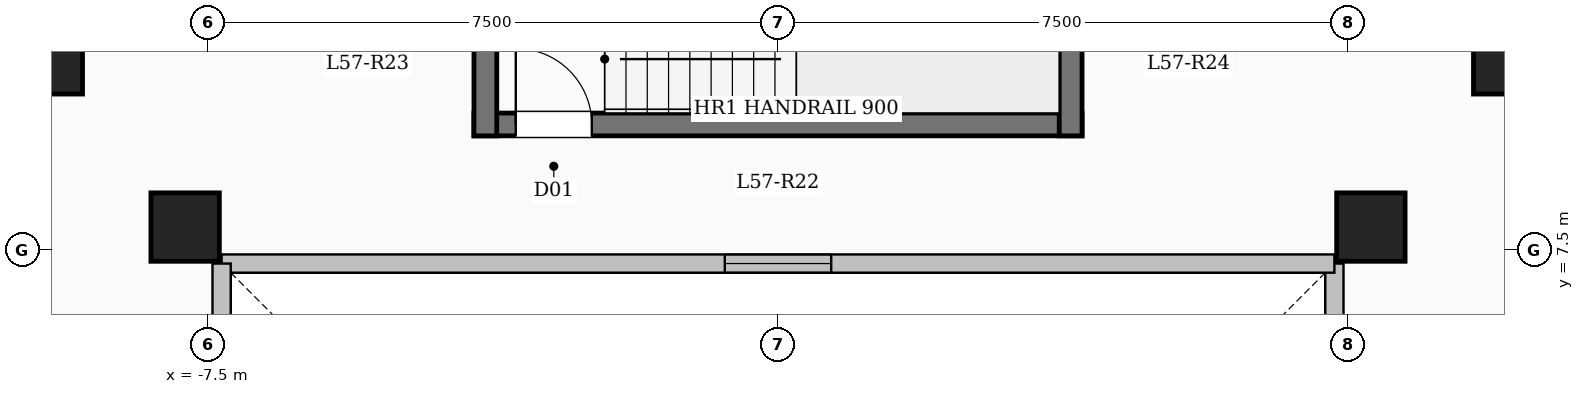
"""IFC4 building model, lengths in metres.
Left out: names, types, materials, properties, quantities, classifications, styles, units other than length and angle.
Written with IfcOpenShell. Run it as: python <this file> out.ifc"""

import sys

from ifc_helpers import new_model, si_unit, direction, frame, frame_2d, origin, origin_2d, place, context, subcontext, project, spatial, rectangle, extrude, element, fill, save


model = new_model("IFC4")
c1 = context("Model", 3, precision=1e-05, world=origin(), true_north=direction((0.0, 1.0)))
c2 = subcontext(c1, "Body", "Model", "MODEL_VIEW")
j1 = project(units=[si_unit("LENGTHUNIT", "METRE"), si_unit("PLANEANGLEUNIT", "RADIAN")], contexts=[c1])
p1 = place(None, origin())
s1 = spatial("IfcSite", under=j1, at=p1, CompositionType="ELEMENT")
p2 = place(p1, origin())
s2 = spatial("IfcBuilding", under=s1, at=p2, CompositionType="ELEMENT")
p3 = place(p2, frame((0.0, 0.0, 210.35)))
s3 = spatial("IfcBuildingStorey", under=s2, at=p3, CompositionType="ELEMENT", Elevation=210.35)
for number, where, z_axis, x_axis in (
    (1, (-7.8, 7.8, 0.0), (0.0, 0.0, 1.0), (1.0, 0.0, 0.0)),
    (2, (7.8, 7.8, 0.0), (0.0, 0.0, 1.0), (1.0, 0.0, 0.0)),
    (3, (-9.6, 10.0, 0.0), (0.0, 0.0, 1.0), (1.0, 0.0, 0.0)),
    (4, (9.6, 10.0, 0.0), (0.0, 0.0, 1.0), (1.0, 0.0, 0.0)),
):
    element("IfcColumn", number, at=place(p3, frame(where, z_axis=z_axis, x_axis=x_axis)), inside=s3, PredefinedType="COLUMN", context=c2, shape_type="SweptSolid", body=[
        extrude(rectangle(XDim=0.9, YDim=0.9, at=origin_2d()), origin(), (0.0, 0.0, 1.0), 3.35),
    ])
p4 = place(p3, frame((7.32, -7.32, 0.0), z_axis=(0.0, 0.0, 1.0), x_axis=(0.0, 1.0, 0.0)))
e5 = element("IfcWall", 5, at=p4, inside=s3, PredefinedType="SOLIDWALL", context=c2, shape_type="SweptSolid", body=[
    extrude(rectangle(XDim=14.64, YDim=0.24, at=frame_2d((7.32, 0.0))), origin(), (0.0, 0.0, 1.0), 3.1),
])
p5 = place(p4, frame((6.62, 0.0, 0.95)))
e6 = element("IfcOpeningElement", 6, at=p5, cuts=e5, PredefinedType="OPENING", context=c2, shape_type="SweptSolid", body=[
    extrude(rectangle(XDim=1.4, YDim=1.5, at=frame_2d((0.7, 0.75))), frame((0.0, 0.13, 0.0), z_axis=(0.0, -1.0, 0.0), x_axis=(1.0, 0.0, 0.0)), (0.0, 0.0, 1.0), 0.26),
])
p6 = place(p3, frame((7.32, 7.32, 0.0), z_axis=(0.0, 0.0, 1.0), x_axis=(-1.0, 0.0, 0.0)))
e7 = element("IfcWall", 7, at=p6, inside=s3, PredefinedType="SOLIDWALL", context=c2, shape_type="SweptSolid", body=[
    extrude(rectangle(XDim=14.64, YDim=0.24, at=frame_2d((7.32, 0.0))), origin(), (0.0, 0.0, 1.0), 3.1),
])
p7 = place(p6, frame((6.62, 0.0, 0.95)))
e8 = element("IfcOpeningElement", 8, at=p7, cuts=e7, PredefinedType="OPENING", context=c2, shape_type="SweptSolid", body=[
    extrude(rectangle(XDim=1.4, YDim=1.5, at=frame_2d((0.7, 0.75))), frame((0.0, 0.13, 0.0), z_axis=(0.0, -1.0, 0.0), x_axis=(1.0, 0.0, 0.0)), (0.0, 0.0, 1.0), 0.26),
])
p8 = place(p3, frame((-7.32, 7.32, 0.0), z_axis=(0.0, 0.0, 1.0), x_axis=(0.0, -1.0, 0.0)))
e9 = element("IfcWall", 9, at=p8, inside=s3, PredefinedType="SOLIDWALL", context=c2, shape_type="SweptSolid", body=[
    extrude(rectangle(XDim=14.64, YDim=0.24, at=frame_2d((7.32, 0.0))), origin(), (0.0, 0.0, 1.0), 3.1),
])
p9 = place(p8, frame((6.62, 0.0, 0.95)))
e10 = element("IfcOpeningElement", 10, at=p9, cuts=e9, PredefinedType="OPENING", context=c2, shape_type="SweptSolid", body=[
    extrude(rectangle(XDim=1.4, YDim=1.5, at=frame_2d((0.7, 0.75))), frame((0.0, 0.13, 0.0), z_axis=(0.0, -1.0, 0.0), x_axis=(1.0, 0.0, 0.0)), (0.0, 0.0, 1.0), 0.26),
])
p10 = place(p3, frame((-4.0, 9.15, 0.0), z_axis=(0.0, 0.0, 1.0), x_axis=(1.0, 0.0, 0.0)))
e11 = element("IfcWall", 11, at=p10, inside=s3, PredefinedType="SHEAR", context=c2, shape_type="SweptSolid", body=[
    extrude(rectangle(XDim=8.0, YDim=0.3, at=frame_2d((4.0, 0.0))), origin(), (0.0, 0.0, 1.0), 3.35),
])
p11 = place(p10, frame((0.55, 0.0, 0.0)))
e12 = element("IfcOpeningElement", 12, at=p11, cuts=e11, PredefinedType="OPENING", context=c2, shape_type="SweptSolid", body=[
    extrude(rectangle(XDim=1.0, YDim=2.15, at=frame_2d((0.5, 1.075))), frame((0.0, 0.16, 0.0), z_axis=(0.0, -1.0, 0.0), x_axis=(1.0, 0.0, 0.0)), (0.0, 0.0, 1.0), 0.32),
])
for number, where, z_axis, x_axis in (
    (13, (-3.85, 9.0, 0.0), (0.0, 0.0, 1.0), (0.0, 1.0, 0.0)),
    (14, (3.85, 9.0, 0.0), (0.0, 0.0, 1.0), (0.0, 1.0, 0.0)),
):
    element("IfcWall", number, at=place(p3, frame(where, z_axis=z_axis, x_axis=x_axis)), inside=s3, PredefinedType="SHEAR", context=c2, shape_type="SweptSolid", body=[
        extrude(rectangle(XDim=3.59, YDim=0.3, at=frame_2d((1.795, 0.0))), origin(), (0.0, 0.0, 1.0), 3.35),
    ])
p12 = place(p7, origin())
e15 = element("IfcWindow", 15, at=p12, inside=s3, PartitioningType="SINGLE_PANEL", PredefinedType="WINDOW", context=c2, shape_type="SweptSolid", body=[
    extrude(rectangle(XDim=1.4, YDim=1.5, at=frame_2d((0.7, 0.75))), frame((0.0, 0.03, 0.0), z_axis=(0.0, -1.0, 0.0), x_axis=(1.0, 0.0, 0.0)), (0.0, 0.0, 1.0), 0.06),
])
fill(e8, e15)
p13 = place(p11, origin())
e16 = element("IfcDoor", 16, at=p13, inside=s3, OperationType="SINGLE_SWING_LEFT", PredefinedType="DOOR", context=c2, shape_type="SweptSolid", body=[
    extrude(rectangle(XDim=1.0, YDim=2.15, at=frame_2d((0.5, 1.075))), frame((0.0, 0.025, 0.0), z_axis=(0.0, -1.0, 0.0), x_axis=(1.0, 0.0, 0.0)), (0.0, 0.0, 1.0), 0.05),
])
fill(e12, e16)
save(model, sys.argv[1])
